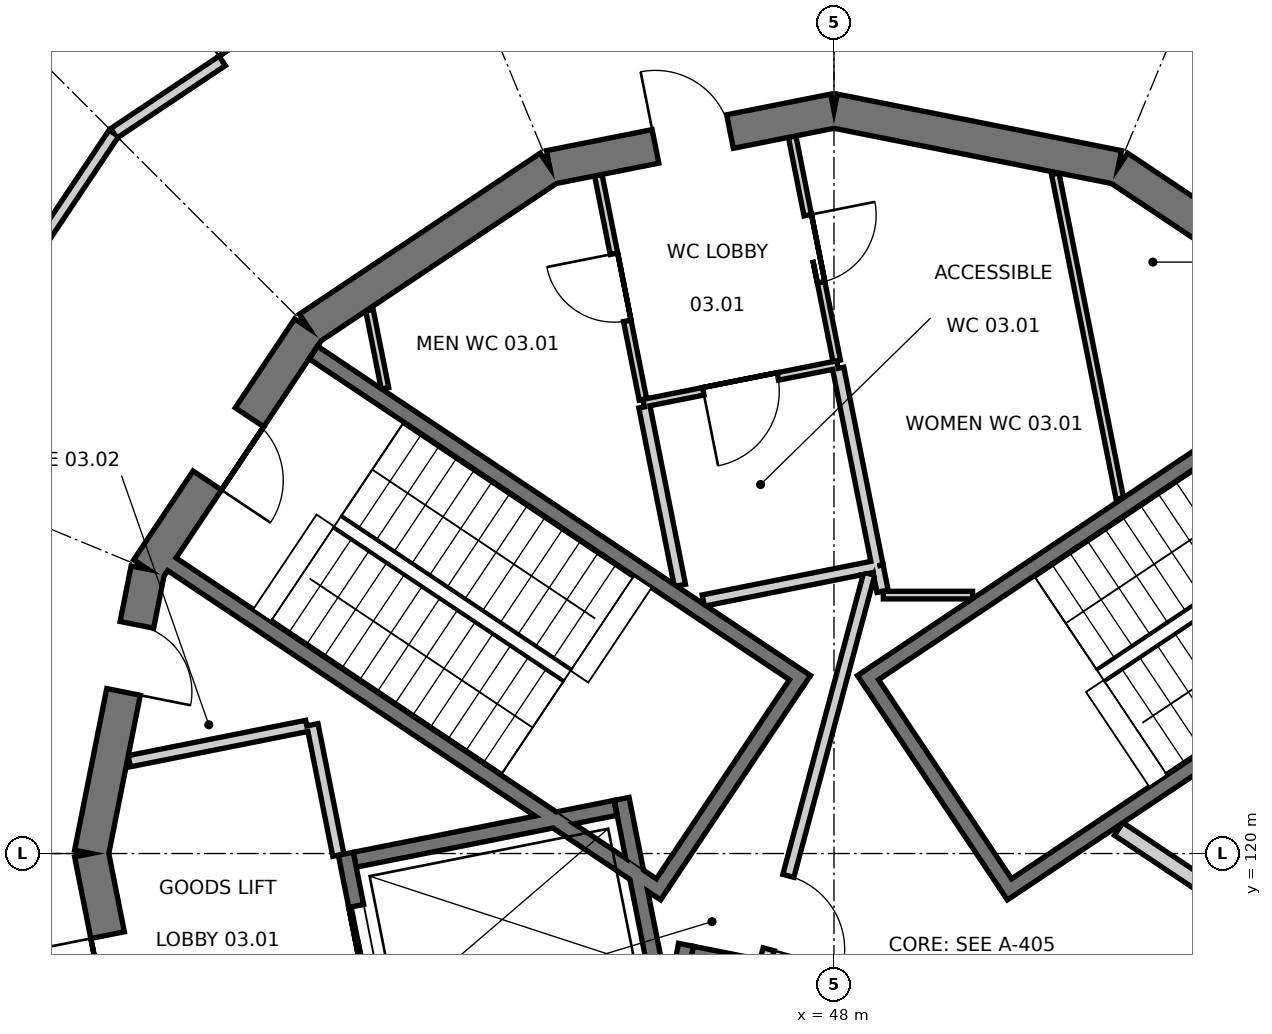
"""IFC4 building model, lengths in metres.
Left out: names, types, materials, properties, quantities, classifications, styles, units other than length and angle.
Written with IfcOpenShell. Run it as: python <this file> out.ifc"""

import sys

from ifc_helpers import new_model, si_unit, direction, frame, frame_2d, origin, place, context, subcontext, project, spatial, polyline, rectangle, outline, extrude, element, fill, save


model = new_model("IFC4")
c1 = context("Model", 3, precision=1e-05, world=origin(), true_north=direction((0.0, 1.0)))
c2 = subcontext(c1, "Body", "Model", "MODEL_VIEW")
j1 = project(units=[si_unit("LENGTHUNIT", "METRE"), si_unit("PLANEANGLEUNIT", "RADIAN")], contexts=[c1])
p1 = place(None, origin())
s1 = spatial("IfcSite", under=j1, at=p1, CompositionType="ELEMENT")
p2 = place(p1, origin())
s2 = spatial("IfcBuilding", under=s1, at=p2, CompositionType="ELEMENT")
p3 = place(p2, frame((0.0, 0.0, 15.6)))
s3 = spatial("IfcBuildingStorey", under=s2, at=p3, CompositionType="ELEMENT", Elevation=15.6)
p4 = place(p3, frame((54.909, 126.909, 0.0), z_axis=(0.0, 0.0, 1.0), x_axis=(-0.83148829117, 0.555542277102, 0.0)))
e1 = element("IfcWall", 1, at=p4, inside=s3, PredefinedType="SHEAR", context=c2, shape_type="SweptSolid", body=[
    extrude(outline(polyline([(-0.045, -0.225), (3.857, -0.225), (3.768, 0.225), (0.045, 0.225), (-0.045, -0.225)])), origin(), (0.0, 0.0, 1.0), 4.8),
])
p5 = place(p4, frame((1.545, 0.0, 0.0)))
e2 = element("IfcOpeningElement", 2, at=p5, cuts=e1, PredefinedType="OPENING", context=c2, shape_type="SweptSolid", body=[
    extrude(rectangle(XDim=0.9, YDim=2.1, at=frame_2d((0.45, 1.05))), frame((0.0, 0.235, 0.0), z_axis=(0.0, -1.0, 0.0), x_axis=(1.0, 0.0, 0.0)), (0.0, 0.0, 1.0), 0.47),
])
p6 = place(p3, frame((51.739, 129.027, 0.0), z_axis=(0.0, 0.0, 1.0), x_axis=(-0.98078948206, 0.195069197673, 0.0)))
e3 = element("IfcWall", 3, at=p6, inside=s3, PredefinedType="SHEAR", context=c2, shape_type="SweptSolid", body=[
    extrude(outline(polyline([(-0.045, -0.225), (3.857, -0.225), (3.768, 0.225), (0.045, 0.225), (-0.045, -0.225)])), origin(), (0.0, 0.0, 1.0), 4.8),
])
p7 = place(p3, frame((48.0, 129.771, 0.0), z_axis=(0.0, 0.0, 1.0), x_axis=(-0.98078948206, -0.195069197673, 0.0)))
e4 = element("IfcWall", 4, at=p7, inside=s3, PredefinedType="SHEAR", context=c2, shape_type="SweptSolid", body=[
    extrude(outline(polyline([(-0.045, -0.225), (3.857, -0.225), (3.768, 0.225), (0.045, 0.225), (-0.045, -0.225)])), origin(), (0.0, 0.0, 1.0), 4.8),
])
p8 = place(p7, frame((1.395, 0.0, 0.0)))
e5 = element("IfcOpeningElement", 5, at=p8, cuts=e4, PredefinedType="OPENING", context=c2, shape_type="SweptSolid", body=[
    extrude(rectangle(XDim=1.0, YDim=2.1, at=frame_2d((0.5, 1.05))), frame((0.0, 0.235, 0.0), z_axis=(0.0, -1.0, 0.0), x_axis=(1.0, 0.0, 0.0)), (0.0, 0.0, 1.0), 0.47),
])
p9 = place(p3, frame((44.261, 129.027, 0.0), z_axis=(0.0, 0.0, 1.0), x_axis=(-0.83148829117, -0.555542277102, 0.0)))
e6 = element("IfcWall", 6, at=p9, inside=s3, PredefinedType="SHEAR", context=c2, shape_type="SweptSolid", body=[
    extrude(outline(polyline([(-0.045, -0.225), (3.857, -0.225), (3.768, 0.225), (0.045, 0.225), (-0.045, -0.225)])), origin(), (0.0, 0.0, 1.0), 4.8),
])
p10 = place(p3, frame((41.091, 126.909, 0.0), z_axis=(0.0, 0.0, 1.0), x_axis=(-0.555542277102, -0.83148829117, 0.0)))
e7 = element("IfcWall", 7, at=p10, inside=s3, PredefinedType="SHEAR", context=c2, shape_type="SweptSolid", body=[
    extrude(outline(polyline([(-0.045, -0.225), (3.857, -0.225), (3.768, 0.225), (0.045, 0.225), (-0.045, -0.225)])), origin(), (0.0, 0.0, 1.0), 4.8),
])
p11 = place(p10, frame((1.406, 0.0, 0.0)))
e8 = element("IfcOpeningElement", 8, at=p11, cuts=e7, PredefinedType="OPENING", context=c2, shape_type="SweptSolid", body=[
    extrude(rectangle(XDim=1.0, YDim=2.1, at=frame_2d((0.5, 1.05))), frame((0.0, 0.235, 0.0), z_axis=(0.0, -1.0, 0.0), x_axis=(1.0, 0.0, 0.0)), (0.0, 0.0, 1.0), 0.47),
])
p12 = place(p3, frame((38.973, 123.739, 0.0), z_axis=(0.0, 0.0, 1.0), x_axis=(-0.195069197673, -0.98078948206, 0.0)))
e9 = element("IfcWall", 9, at=p12, inside=s3, PredefinedType="SHEAR", context=c2, shape_type="SweptSolid", body=[
    extrude(outline(polyline([(-0.045, -0.225), (3.857, -0.225), (3.768, 0.225), (0.045, 0.225), (-0.045, -0.225)])), origin(), (0.0, 0.0, 1.0), 4.8),
])
p13 = place(p12, frame((0.745, 0.0, 0.0)))
e10 = element("IfcOpeningElement", 10, at=p13, cuts=e9, PredefinedType="OPENING", context=c2, shape_type="SweptSolid", body=[
    extrude(rectangle(XDim=0.9, YDim=2.1, at=frame_2d((0.45, 1.05))), frame((0.0, 0.235, 0.0), z_axis=(0.0, -1.0, 0.0), x_axis=(1.0, 0.0, 0.0)), (0.0, 0.0, 1.0), 0.47),
])
p14 = place(p3, frame((38.229, 120.0, 0.0), z_axis=(0.0, 0.0, 1.0), x_axis=(0.195069197673, -0.98078948206, 0.0)))
e11 = element("IfcWall", 11, at=p14, inside=s3, PredefinedType="SHEAR", context=c2, shape_type="SweptSolid", body=[
    extrude(outline(polyline([(-0.045, -0.225), (3.857, -0.225), (3.768, 0.225), (0.045, 0.225), (-0.045, -0.225)])), origin(), (0.0, 0.0, 1.0), 4.8),
])
p15 = place(p14, frame((1.095, 0.0, 0.0)))
e12 = element("IfcOpeningElement", 12, at=p15, cuts=e11, PredefinedType="OPENING", context=c2, shape_type="SweptSolid", body=[
    extrude(rectangle(XDim=1.6, YDim=2.1, at=frame_2d((0.8, 1.05))), frame((0.0, 0.235, 0.0), z_axis=(0.0, -1.0, 0.0), x_axis=(1.0, 0.0, 0.0)), (0.0, 0.0, 1.0), 0.47),
])
p16 = place(p3, frame((48.365, 122.258, 0.0), z_axis=(0.0, 0.0, 1.0), x_axis=(0.831476803301, 0.555559470779, 0.0)))
e13 = element("IfcWall", 13, at=p16, inside=s3, PredefinedType="SHEAR", context=c2, shape_type="SweptSolid", body=[
    extrude(rectangle(XDim=7.8, YDim=0.2, at=frame_2d((3.9, 0.0))), origin(), (0.0, 0.0, 1.0), 4.8),
])
p17 = place(p3, frame((50.226, 119.473, 0.0), z_axis=(0.0, 0.0, 1.0), x_axis=(0.831486463828, 0.555545012102, 0.0)))
e14 = element("IfcWall", 14, at=p17, inside=s3, PredefinedType="SHEAR", context=c2, shape_type="SweptSolid", body=[
    extrude(rectangle(XDim=7.8, YDim=0.2, at=frame_2d((3.9, 0.0))), origin(), (0.0, 0.0, 1.0), 4.8),
])
p18 = place(p3, frame((50.253, 119.612, 0.0), z_axis=(0.0, 0.0, 1.0), x_axis=(-0.55555842186, 0.831477504146, 0.0)))
e15 = element("IfcWall", 15, at=p18, inside=s3, PredefinedType="SHEAR", context=c2, shape_type="SweptSolid", body=[
    extrude(rectangle(XDim=3.15, YDim=0.2, at=frame_2d((1.575, 0.0))), origin(), (0.0, 0.0, 1.0), 4.8),
])
p19 = place(p3, frame((45.774, 119.473, 0.0), z_axis=(0.0, 0.0, 1.0), x_axis=(-0.831486463828, 0.555545012102, 0.0)))
e16 = element("IfcWall", 16, at=p19, inside=s3, PredefinedType="SHEAR", context=c2, shape_type="SweptSolid", body=[
    extrude(rectangle(XDim=7.8, YDim=0.2, at=frame_2d((3.9, 0.0))), origin(), (0.0, 0.0, 1.0), 4.8),
])
p20 = place(p3, frame((47.635, 122.258, 0.0), z_axis=(0.0, 0.0, 1.0), x_axis=(-0.831476803301, 0.555559470779, 0.0)))
e17 = element("IfcWall", 17, at=p20, inside=s3, PredefinedType="SHEAR", context=c2, shape_type="SweptSolid", body=[
    extrude(rectangle(XDim=7.8, YDim=0.2, at=frame_2d((3.9, 0.0))), origin(), (0.0, 0.0, 1.0), 4.8),
])
p21 = place(p3, frame((47.497, 122.231, 0.0), z_axis=(0.0, 0.0, 1.0), x_axis=(-0.55555842186, -0.831477504146, 0.0)))
e18 = element("IfcWall", 18, at=p21, inside=s3, PredefinedType="SHEAR", context=c2, shape_type="SweptSolid", body=[
    extrude(rectangle(XDim=3.15, YDim=0.2, at=frame_2d((1.575, 0.0))), origin(), (0.0, 0.0, 1.0), 4.8),
])
p22 = place(p3, frame((46.053, 118.799, 0.0), z_axis=(0.0, 0.0, 1.0), x_axis=(-0.195092759861, -0.980784795483, 0.0)))
e19 = element("IfcWall", 19, at=p22, inside=s3, PredefinedType="SHEAR", context=c2, shape_type="SweptSolid", body=[
    extrude(rectangle(XDim=7.8, YDim=0.2, at=frame_2d((3.9, 0.0))), origin(), (0.0, 0.0, 1.0), 4.8),
])
p23 = place(p3, frame((46.132, 118.681, 0.0), z_axis=(0.0, 0.0, 1.0), x_axis=(0.980785830564, -0.195087556151, 0.0)))
e20 = element("IfcWall", 20, at=p23, inside=s3, PredefinedType="SHEAR", context=c2, shape_type="SweptSolid", body=[
    extrude(rectangle(XDim=3.15, YDim=0.2, at=frame_2d((1.575, 0.0))), origin(), (0.0, 0.0, 1.0), 4.8),
])
p24 = place(p3, frame((41.577, 119.997, 0.0), z_axis=(0.0, 0.0, 1.0), x_axis=(0.195120673769, -0.980779242576, 0.0)))
e21 = element("IfcWall", 21, at=p24, inside=s3, PredefinedType="SHEAR", context=c2, shape_type="SweptSolid", body=[
    extrude(rectangle(XDim=2.5, YDim=0.2, at=frame_2d((1.25, 0.0))), origin(), (0.0, 0.0, 1.0), 4.8),
])
p25 = place(p24, frame((0.7, 0.0, 0.0)))
e22 = element("IfcOpeningElement", 22, at=p25, cuts=e21, PredefinedType="OPENING", context=c2, shape_type="SweptSolid", body=[
    extrude(rectangle(XDim=1.1, YDim=2.1, at=frame_2d((0.55, 1.05))), frame((0.0, 0.11, 0.0), z_axis=(0.0, -1.0, 0.0), x_axis=(1.0, 0.0, 0.0)), (0.0, 0.0, 1.0), 0.22),
])
p26 = place(p3, frame((45.206, 120.719, 0.0), z_axis=(0.0, 0.0, 1.0), x_axis=(0.195158270522, -0.980771762158, 0.0)))
e23 = element("IfcWall", 23, at=p26, inside=s3, PredefinedType="SHEAR", context=c2, shape_type="SweptSolid", body=[
    extrude(rectangle(XDim=2.647, YDim=0.2, at=frame_2d((1.323, 0.0))), origin(), (0.0, 0.0, 1.0), 4.8),
])
p27 = place(p3, frame((45.127, 120.601, 0.0), z_axis=(0.0, 0.0, 1.0), x_axis=(-0.980794727808, -0.195042820694, 0.0)))
e24 = element("IfcWall", 24, at=p27, inside=s3, PredefinedType="SHEAR", context=c2, shape_type="SweptSolid", body=[
    extrude(rectangle(XDim=3.5, YDim=0.2, at=frame_2d((1.75, 0.0))), origin(), (0.0, 0.0, 1.0), 4.8),
])
p28 = place(p3, frame((55.126, 118.065, 0.0), z_axis=(0.0, 0.0, 1.0), x_axis=(-0.831495502265, 0.555531483998, 0.0)))
e25 = element("IfcWall", 25, at=p28, inside=s3, PredefinedType="SOLIDWALL", context=c2, shape_type="SweptSolid", body=[
    extrude(rectangle(XDim=4.065, YDim=0.2, at=frame_2d((2.033, 0.0))), origin(), (0.0, 0.0, 1.0), 4.52),
])
p29 = place(p3, frame((41.479, 119.977, 0.0), z_axis=(0.0, 0.0, 1.0), x_axis=(-0.19501613536, 0.98080003413, 0.0)))
e26 = element("IfcWall", 26, at=p29, inside=s3, PredefinedType="PARTITIONING", context=c2, shape_type="SweptSolid", body=[
    extrude(rectangle(XDim=1.75, YDim=0.15, at=frame_2d((0.875, 0.0))), origin(), (0.0, 0.0, 1.0), 4.52),
])
p30 = place(p3, frame((41.064, 121.679, 0.0), z_axis=(0.0, 0.0, 1.0), x_axis=(-0.980781272394, -0.195110470559, 0.0)))
e27 = element("IfcWall", 27, at=p30, inside=s3, PredefinedType="PARTITIONING", context=c2, shape_type="SweptSolid", body=[
    extrude(rectangle(XDim=2.381, YDim=0.15, at=frame_2d((1.19, 0.0))), origin(), (0.0, 0.0, 1.0), 4.52),
])
p31 = place(p3, frame((48.046, 126.433, 0.0), z_axis=(0.0, 0.0, 1.0), x_axis=(-0.980778805994, -0.195122868248, 0.0)))
e28 = element("IfcWall", 28, at=p31, inside=s3, PredefinedType="PARTITIONING", context=c2, shape_type="SweptSolid", body=[
    extrude(rectangle(XDim=2.6, YDim=0.1, at=frame_2d((1.3, 0.0))), origin(), (0.0, 0.0, 1.0), 4.52),
])
p32 = place(p31, frame((0.8, 0.0, 0.0)))
e29 = element("IfcOpeningElement", 29, at=p32, cuts=e28, PredefinedType="OPENING", context=c2, shape_type="SweptSolid", body=[
    extrude(rectangle(XDim=1.0, YDim=2.1, at=frame_2d((0.5, 1.05))), frame((0.0, 0.06, 0.0), z_axis=(0.0, -1.0, 0.0), x_axis=(1.0, 0.0, 0.0)), (0.0, 0.0, 1.0), 0.12),
])
p33 = place(p3, frame((45.486, 125.974, 0.0), z_axis=(0.0, 0.0, 1.0), x_axis=(-0.195054549846, 0.980792395252, 0.0)))
e30 = element("IfcWall", 30, at=p33, inside=s3, PredefinedType="PARTITIONING", context=c2, shape_type="SweptSolid", body=[
    extrude(rectangle(XDim=3.008, YDim=0.1, at=frame_2d((1.504, 0.0))), origin(), (0.0, 0.0, 1.0), 4.52),
])
p34 = place(p33, frame((1.054, 0.0, 0.0)))
e31 = element("IfcOpeningElement", 31, at=p34, cuts=e30, PredefinedType="OPENING", context=c2, shape_type="SweptSolid", body=[
    extrude(rectangle(XDim=0.9, YDim=2.1, at=frame_2d((0.45, 1.05))), frame((0.0, 0.06, 0.0), z_axis=(0.0, -1.0, 0.0), x_axis=(1.0, 0.0, 0.0)), (0.0, 0.0, 1.0), 0.12),
])
p35 = place(p3, frame((47.449, 129.432, 0.0), z_axis=(0.0, 0.0, 1.0), x_axis=(0.195054549846, -0.980792395252, 0.0)))
e32 = element("IfcWall", 32, at=p35, inside=s3, PredefinedType="PARTITIONING", context=c2, shape_type="SweptSolid", body=[
    extrude(rectangle(XDim=3.008, YDim=0.1, at=frame_2d((1.504, 0.0))), origin(), (0.0, 0.0, 1.0), 4.52),
])
p36 = place(p35, frame((1.054, 0.0, 0.0)))
e33 = element("IfcOpeningElement", 33, at=p36, cuts=e32, PredefinedType="OPENING", context=c2, shape_type="SweptSolid", body=[
    extrude(rectangle(XDim=0.9, YDim=2.1, at=frame_2d((0.45, 1.05))), frame((0.0, 0.06, 0.0), z_axis=(0.0, -1.0, 0.0), x_axis=(1.0, 0.0, 0.0)), (0.0, 0.0, 1.0), 0.12),
])
p37 = place(p3, frame((48.056, 126.384, 0.0), z_axis=(0.0, 0.0, 1.0), x_axis=(0.195123903338, -0.980778600065, 0.0)))
e34 = element("IfcWall", 34, at=p37, inside=s3, PredefinedType="PARTITIONING", context=c2, shape_type="SweptSolid", body=[
    extrude(rectangle(XDim=2.65, YDim=0.15, at=frame_2d((1.325, 0.0))), origin(), (0.0, 0.0, 1.0), 4.52),
])
p38 = place(p3, frame((48.524, 123.775, 0.0), z_axis=(0.0, 0.0, 1.0), x_axis=(-0.980777249161, -0.195130693455, 0.0)))
e35 = element("IfcWall", 35, at=p38, inside=s3, PredefinedType="PARTITIONING", context=c2, shape_type="SweptSolid", body=[
    extrude(rectangle(XDim=2.287, YDim=0.15, at=frame_2d((1.144, 0.0))), origin(), (0.0, 0.0, 1.0), 4.52),
])
p39 = place(p3, frame((45.973, 123.528, 0.0), z_axis=(0.0, 0.0, 1.0), x_axis=(-0.195135731435, 0.980776246815, 0.0)))
e36 = element("IfcWall", 36, at=p39, inside=s3, PredefinedType="PARTITIONING", context=c2, shape_type="SweptSolid", body=[
    extrude(rectangle(XDim=2.395, YDim=0.15, at=frame_2d((1.197, 0.0))), origin(), (0.0, 0.0, 1.0), 4.52),
])
p40 = place(p3, frame((42.093, 126.12, 0.0), z_axis=(0.0, 0.0, 1.0), x_axis=(-0.195175461866, 0.980768341192, 0.0)))
e37 = element("IfcWall", 37, at=p40, inside=s3, PredefinedType="PARTITIONING", context=c2, shape_type="SweptSolid", body=[
    extrude(rectangle(XDim=1.048, YDim=0.1, at=frame_2d((0.524, 0.0))), origin(), (0.0, 0.0, 1.0), 4.52),
])
p41 = place(p3, frame((50.911, 128.943, 0.0), z_axis=(0.0, 0.0, 1.0), x_axis=(0.195113868301, -0.980780596462, 0.0)))
e38 = element("IfcWall", 38, at=p41, inside=s3, PredefinedType="PARTITIONING", context=c2, shape_type="SweptSolid", body=[
    extrude(rectangle(XDim=4.357, YDim=0.1, at=frame_2d((2.178, 0.0))), origin(), (0.0, 0.0, 1.0), 4.52),
])
p42 = place(p3, frame((49.823, 123.4, 0.0), z_axis=(0.0, 0.0, 1.0), x_axis=(-1.0, 0.0, 0.0)))
e39 = element("IfcWall", 39, at=p42, inside=s3, PredefinedType="PARTITIONING", context=c2, shape_type="SweptSolid", body=[
    extrude(rectangle(XDim=1.174, YDim=0.1, at=frame_2d((0.587, 0.0))), origin(), (0.0, 0.0, 1.0), 4.52),
])
p43 = place(p3, frame((48.639, 123.449, 0.0), z_axis=(0.0, 0.0, 1.0), x_axis=(-0.194880473507, 0.98082699853, 0.0)))
e40 = element("IfcWall", 40, at=p43, inside=s3, PredefinedType="PARTITIONING", context=c2, shape_type="SweptSolid", body=[
    extrude(rectangle(XDim=0.342, YDim=0.15, at=frame_2d((0.171, 0.0))), origin(), (0.0, 0.0, 1.0), 4.52),
])
p44 = place(p3, frame((47.102, 118.595, 0.0), z_axis=(0.0, 0.0, 1.0), x_axis=(0.258814124304, 0.9659271448, 0.0)))
e41 = element("IfcWall", 41, at=p44, inside=s3, PredefinedType="PARTITIONING", context=c2, shape_type="SweptSolid", body=[
    extrude(rectangle(XDim=5.265, YDim=0.15, at=frame_2d((2.632, 0.0))), origin(), (0.0, 0.0, 1.0), 4.52),
])
p45 = place(p44, frame((0.15, 0.0, 0.0)))
e42 = element("IfcOpeningElement", 42, at=p45, cuts=e41, PredefinedType="OPENING", context=c2, shape_type="SweptSolid", body=[
    extrude(rectangle(XDim=1.0, YDim=2.1, at=frame_2d((0.5, 1.05))), frame((0.0, 0.085, 0.0), z_axis=(0.0, -1.0, 0.0), x_axis=(1.0, 0.0, 0.0)), (0.0, 0.0, 1.0), 0.17),
])
p46 = place(p3, frame((35.62, 125.128, 0.0), z_axis=(0.0, 0.0, 1.0), x_axis=(0.555583506678, 0.831460742974, 0.0)))
e43 = element("IfcWall", 43, at=p46, inside=s3, PredefinedType="PARTITIONING", context=c2, shape_type="SweptSolid", body=[
    extrude(rectangle(XDim=5.228, YDim=0.15, at=frame_2d((2.614, 0.0))), origin(), (0.0, 0.0, 1.0), 4.52),
])
p47 = place(p3, frame((38.525, 129.475, 0.0), z_axis=(0.0, 0.0, 1.0), x_axis=(0.831460742974, 0.555583506678, 0.0)))
e44 = element("IfcWall", 44, at=p47, inside=s3, PredefinedType="PARTITIONING", context=c2, shape_type="SweptSolid", body=[
    extrude(rectangle(XDim=5.228, YDim=0.15, at=frame_2d((2.614, 0.0))), origin(), (0.0, 0.0, 1.0), 4.52),
])
p48 = place(p47, frame((1.714, 0.0, 0.0)))
e45 = element("IfcOpeningElement", 45, at=p48, cuts=e44, PredefinedType="OPENING", context=c2, shape_type="SweptSolid", body=[
    extrude(rectangle(XDim=1.8, YDim=2.1, at=frame_2d((0.9, 1.05))), frame((0.0, 0.085, 0.0), z_axis=(0.0, -1.0, 0.0), x_axis=(1.0, 0.0, 0.0)), (0.0, 0.0, 1.0), 0.17),
])
p49 = place(p11, origin())
e46 = element("IfcDoor", 46, at=p49, inside=s3, OperationType="SINGLE_SWING_RIGHT", PredefinedType="DOOR", context=c2, shape_type="SweptSolid", body=[
    extrude(rectangle(XDim=1.0, YDim=2.1, at=frame_2d((0.5, 1.05))), frame((0.0, 0.025, 0.0), z_axis=(0.0, -1.0, 0.0), x_axis=(1.0, 0.0, 0.0)), (0.0, 0.0, 1.0), 0.05),
])
fill(e8, e46)
p50 = place(p25, origin())
e47 = element("IfcDoor", 47, at=p50, inside=s3, OperationType="SLIDING_TO_LEFT", PredefinedType="DOOR", context=c2, shape_type="SweptSolid", body=[
    extrude(rectangle(XDim=1.1, YDim=2.1, at=frame_2d((0.55, 1.05))), frame((0.0, 0.025, 0.0), z_axis=(0.0, -1.0, 0.0), x_axis=(1.0, 0.0, 0.0)), (0.0, 0.0, 1.0), 0.05),
])
fill(e22, e47)
p51 = place(p15, frame((1.6, 0.0, 0.0), z_axis=(0.0, 0.0, 1.0), x_axis=(-1.0, 0.0, 0.0)))
e48 = element("IfcDoor", 48, at=p51, inside=s3, OperationType="DOUBLE_DOOR_SINGLE_SWING", PredefinedType="DOOR", context=c2, shape_type="SweptSolid", body=[
    extrude(rectangle(XDim=1.6, YDim=2.1, at=frame_2d((0.8, 1.05))), frame((0.0, 0.025, 0.0), z_axis=(0.0, -1.0, 0.0), x_axis=(1.0, 0.0, 0.0)), (0.0, 0.0, 1.0), 0.05),
])
fill(e12, e48)
p52 = place(p8, frame((1.0, 0.0, 0.0), z_axis=(0.0, 0.0, 1.0), x_axis=(-1.0, 0.0, 0.0)))
e49 = element("IfcDoor", 49, at=p52, inside=s3, OperationType="SINGLE_SWING_LEFT", PredefinedType="DOOR", context=c2, shape_type="SweptSolid", body=[
    extrude(rectangle(XDim=1.0, YDim=2.1, at=frame_2d((0.5, 1.05))), frame((0.0, 0.025, 0.0), z_axis=(0.0, -1.0, 0.0), x_axis=(1.0, 0.0, 0.0)), (0.0, 0.0, 1.0), 0.05),
])
fill(e5, e49)
p53 = place(p13, origin())
e50 = element("IfcDoor", 50, at=p53, inside=s3, OperationType="SINGLE_SWING_RIGHT", PredefinedType="DOOR", context=c2, shape_type="SweptSolid", body=[
    extrude(rectangle(XDim=0.9, YDim=2.1, at=frame_2d((0.45, 1.05))), frame((0.0, 0.025, 0.0), z_axis=(0.0, -1.0, 0.0), x_axis=(1.0, 0.0, 0.0)), (0.0, 0.0, 1.0), 0.05),
])
fill(e10, e50)
p54 = place(p32, origin())
e51 = element("IfcDoor", 51, at=p54, inside=s3, OperationType="SINGLE_SWING_RIGHT", PredefinedType="DOOR", context=c2, shape_type="SweptSolid", body=[
    extrude(rectangle(XDim=1.0, YDim=2.1, at=frame_2d((0.5, 1.05))), frame((0.0, 0.025, 0.0), z_axis=(0.0, -1.0, 0.0), x_axis=(1.0, 0.0, 0.0)), (0.0, 0.0, 1.0), 0.05),
])
fill(e29, e51)
p55 = place(p34, origin())
e52 = element("IfcDoor", 52, at=p55, inside=s3, OperationType="SINGLE_SWING_RIGHT", PredefinedType="DOOR", context=c2, shape_type="SweptSolid", body=[
    extrude(rectangle(XDim=0.9, YDim=2.1, at=frame_2d((0.45, 1.05))), frame((0.0, 0.025, 0.0), z_axis=(0.0, -1.0, 0.0), x_axis=(1.0, 0.0, 0.0)), (0.0, 0.0, 1.0), 0.05),
])
fill(e31, e52)
p56 = place(p36, origin())
e53 = element("IfcDoor", 53, at=p56, inside=s3, OperationType="SINGLE_SWING_LEFT", PredefinedType="DOOR", context=c2, shape_type="SweptSolid", body=[
    extrude(rectangle(XDim=0.9, YDim=2.1, at=frame_2d((0.45, 1.05))), frame((0.0, 0.025, 0.0), z_axis=(0.0, -1.0, 0.0), x_axis=(1.0, 0.0, 0.0)), (0.0, 0.0, 1.0), 0.05),
])
fill(e33, e53)
p57 = place(p45, frame((1.0, 0.0, 0.0), z_axis=(0.0, 0.0, 1.0), x_axis=(-1.0, 0.0, 0.0)))
e54 = element("IfcDoor", 54, at=p57, inside=s3, OperationType="SINGLE_SWING_RIGHT", PredefinedType="DOOR", context=c2, shape_type="SweptSolid", body=[
    extrude(rectangle(XDim=1.0, YDim=2.1, at=frame_2d((0.5, 1.05))), frame((0.0, 0.025, 0.0), z_axis=(0.0, -1.0, 0.0), x_axis=(1.0, 0.0, 0.0)), (0.0, 0.0, 1.0), 0.05),
])
fill(e42, e54)
p58 = place(p48, origin())
e55 = element("IfcDoor", 55, at=p58, inside=s3, OperationType="DOUBLE_DOOR_SINGLE_SWING", PredefinedType="DOOR", context=c2, shape_type="SweptSolid", body=[
    extrude(rectangle(XDim=1.8, YDim=2.1, at=frame_2d((0.9, 1.05))), frame((0.0, 0.025, 0.0), z_axis=(0.0, -1.0, 0.0), x_axis=(1.0, 0.0, 0.0)), (0.0, 0.0, 1.0), 0.05),
])
fill(e45, e55)
save(model, sys.argv[1])
